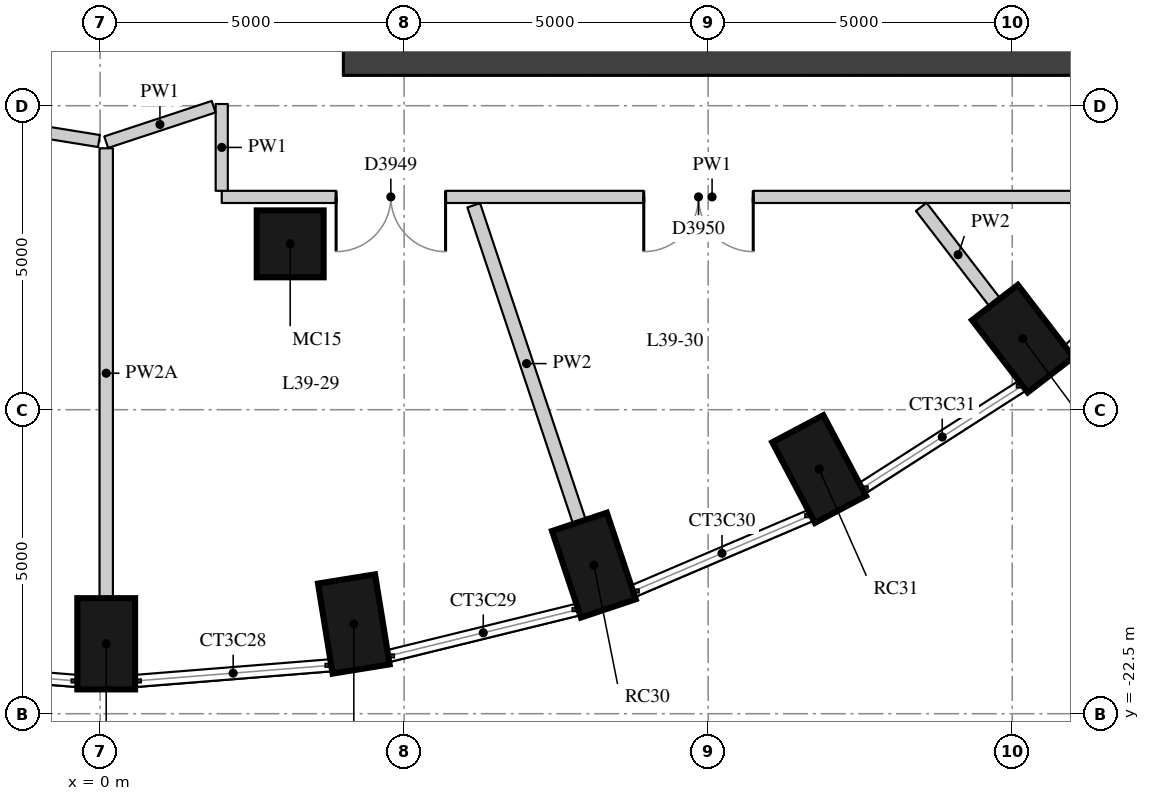
"""IFC4 building model, lengths in metres.
Left out: names, types, materials, properties, quantities, classifications, styles, units other than length and angle.
Written with IfcOpenShell. Run it as: python <this file> out.ifc"""

import sys

from ifc_helpers import new_model, si_unit, direction, frame, frame_2d, origin, origin_2d, place, context, subcontext, project, spatial, rectangle, extrude, element, fill, save


model = new_model("IFC4")
c1 = context("Model", 3, precision=1e-05, world=origin(), true_north=direction((0.0, 1.0)))
c2 = subcontext(c1, "Body", "Model", "MODEL_VIEW")
j1 = project(units=[si_unit("LENGTHUNIT", "METRE"), si_unit("PLANEANGLEUNIT", "RADIAN")], contexts=[c1])
p1 = place(None, origin())
s1 = spatial("IfcSite", under=j1, at=p1, CompositionType="ELEMENT")
p2 = place(p1, origin())
s2 = spatial("IfcBuilding", under=s1, at=p2, CompositionType="ELEMENT")
p3 = place(p2, frame((0.0, 0.0, 139.6)))
s3 = spatial("IfcBuildingStorey", under=s2, at=p3, CompositionType="ELEMENT", Elevation=139.6)
for number, where, z_axis, x_axis in (
    (1, (0.1, -21.35, 0.0), (0.0, 0.0, 1.0), (0.0, -1.0, 0.0)),
    (2, (4.172, -21.024, 0.0), (0.0, 0.0, 1.0), (0.16, -0.987, 0.0)),
    (3, (8.12, -20.056, 0.0), (0.0, 0.0, 1.0), (0.317, -0.949, 0.0)),
    (4, (11.825, -18.476, 0.0), (0.0, 0.0, 1.0), (0.468, -0.884, 0.0)),
    (5, (15.173, -16.332, 0.0), (0.0, 0.0, 1.0), (0.61, -0.792, 0.0)),
):
    element("IfcColumn", number, at=place(p3, frame(where, z_axis=z_axis, x_axis=x_axis)), inside=s3, PredefinedType="COLUMN", context=c2, shape_type="SweptSolid", body=[
        extrude(rectangle(XDim=1.5, YDim=0.95, at=origin_2d()), origin(), (0.0, 0.0, 1.0), 5.5),
    ])
p4 = place(p3, frame((3.126, -14.772, 0.0), z_axis=(0.0, 0.0, 1.0), x_axis=(1.0, 0.0, 0.0)))
e6 = element("IfcColumn", 6, at=p4, inside=s3, PredefinedType="COLUMN", context=c2, shape_type="SweptSolid", body=[
    extrude(rectangle(XDim=1.1, YDim=1.1, at=origin_2d()), origin(), (0.0, 0.0, 1.0), 5.5),
])
p5 = place(p3, frame((4.0, -11.55, 0.0), z_axis=(0.0, 0.0, 1.0), x_axis=(1.0, 0.0, 0.0)))
e7 = element("IfcWall", 7, at=p5, inside=s3, PredefinedType="SHEAR", context=c2, shape_type="SweptSolid", body=[
    extrude(rectangle(XDim=15.2, YDim=0.9, at=frame_2d((7.6, 0.0))), origin(), (0.0, 0.0, 1.0), 5.22),
])
p6 = place(p3, frame((18.128, -14.0, 0.0), z_axis=(0.0, 0.0, 1.0), x_axis=(-1.0, 0.0, 0.0)))
e8 = element("IfcWall", 8, at=p6, inside=s3, PredefinedType="PARTITIONING", context=c2, shape_type="SweptSolid", body=[
    extrude(rectangle(XDim=16.128, YDim=0.2, at=frame_2d((8.064, 0.0))), origin(), (0.0, 0.0, 1.0), 5.22),
])
p7 = place(p6, frame((12.447, 0.0, 0.0)))
e9 = element("IfcOpeningElement", 9, at=p7, cuts=e8, PredefinedType="OPENING", context=c2, shape_type="SweptSolid", body=[
    extrude(rectangle(XDim=1.8, YDim=2.1, at=frame_2d((0.9, 1.05))), frame((0.0, 0.11, 0.0), z_axis=(0.0, -1.0, 0.0), x_axis=(1.0, 0.0, 0.0)), (0.0, 0.0, 1.0), 0.22),
])
p8 = place(p6, frame((7.387, 0.0, 0.0)))
e10 = element("IfcOpeningElement", 10, at=p8, cuts=e8, PredefinedType="OPENING", context=c2, shape_type="SweptSolid", body=[
    extrude(rectangle(XDim=1.8, YDim=2.1, at=frame_2d((0.9, 1.05))), frame((0.0, 0.11, 0.0), z_axis=(0.0, -1.0, 0.0), x_axis=(1.0, 0.0, 0.0)), (0.0, 0.0, 1.0), 0.22),
])
p9 = place(p3, frame((2.0, -13.9, 0.0), z_axis=(0.0, 0.0, 1.0), x_axis=(0.0, 1.0, 0.0)))
e11 = element("IfcWall", 11, at=p9, inside=s3, PredefinedType="PARTITIONING", context=c2, shape_type="SweptSolid", body=[
    extrude(rectangle(XDim=1.428, YDim=0.2, at=frame_2d((0.714, 0.0))), origin(), (0.0, 0.0, 1.0), 5.22),
])
p10 = place(p3, frame((1.867, -12.517, 0.0), z_axis=(0.0, 0.0, 1.0), x_axis=(-0.949545826554, -0.313628320269, 0.0)))
e12 = element("IfcWall", 12, at=p10, inside=s3, PredefinedType="PARTITIONING", context=c2, shape_type="SweptSolid", body=[
    extrude(rectangle(XDim=1.86, YDim=0.2, at=frame_2d((0.93, 0.0))), origin(), (0.0, 0.0, 1.0), 5.22),
])
p11 = place(p3, frame((-0.019, -13.081, 0.0), z_axis=(0.0, 0.0, 1.0), x_axis=(-0.987225228175, 0.159330941296, 0.0)))
e13 = element("IfcWall", 13, at=p11, inside=s3, PredefinedType="PARTITIONING", context=c2, shape_type="SweptSolid", body=[
    extrude(rectangle(XDim=5.377, YDim=0.2, at=frame_2d((2.688, 0.0))), origin(), (0.0, 0.0, 1.0), 5.22),
])
p12 = place(p11, frame((1.262, 0.0, 0.0)))
e14 = element("IfcOpeningElement", 14, at=p12, cuts=e13, PredefinedType="OPENING", context=c2, shape_type="SweptSolid", body=[
    extrude(rectangle(XDim=1.8, YDim=2.1, at=frame_2d((0.9, 1.05))), frame((0.0, 0.11, 0.0), z_axis=(0.0, -1.0, 0.0), x_axis=(1.0, 0.0, 0.0)), (0.0, 0.0, 1.0), 0.22),
])
p13 = place(p3, frame((0.1, -20.6, 0.0), z_axis=(0.0, 0.0, 1.0), x_axis=(0.0, 1.0, 0.0)))
e15 = element("IfcWall", 15, at=p13, inside=s3, PredefinedType="PARTITIONING", context=c2, shape_type="SweptSolid", body=[
    extrude(rectangle(XDim=7.4, YDim=0.22, at=frame_2d((3.7, 0.0))), origin(), (0.0, 0.0, 1.0), 4.77),
])
p14 = place(p3, frame((7.883, -19.345, 0.0), z_axis=(0.0, 0.0, 1.0), x_axis=(-0.316708057884, 0.948523065651, 0.0)))
e16 = element("IfcWall", 16, at=p14, inside=s3, PredefinedType="PARTITIONING", context=c2, shape_type="SweptSolid", body=[
    extrude(rectangle(XDim=5.489, YDim=0.22, at=frame_2d((2.745, 0.0))), origin(), (0.0, 0.0, 1.0), 5.22),
])
p15 = place(p3, frame((14.716, -15.737, 0.0), z_axis=(0.0, 0.0, 1.0), x_axis=(-0.609984006336, 0.792413725281, 0.0)))
e17 = element("IfcWall", 17, at=p15, inside=s3, PredefinedType="PARTITIONING", context=c2, shape_type="SweptSolid", body=[
    extrude(rectangle(XDim=1.986, YDim=0.22, at=frame_2d((0.993, 0.0))), origin(), (0.0, 0.0, 1.0), 5.22),
])
p16 = place(p7, origin())
e18 = element("IfcDoor", 18, at=p16, inside=s3, OperationType="DOUBLE_DOOR_SINGLE_SWING", PredefinedType="DOOR", context=c2, shape_type="SweptSolid", body=[
    extrude(rectangle(XDim=1.8, YDim=2.1, at=frame_2d((0.9, 1.05))), frame((0.0, 0.025, 0.0), z_axis=(0.0, -1.0, 0.0), x_axis=(1.0, 0.0, 0.0)), (0.0, 0.0, 1.0), 0.05),
])
fill(e9, e18)
p17 = place(p8, origin())
e19 = element("IfcDoor", 19, at=p17, inside=s3, OperationType="DOUBLE_DOOR_SINGLE_SWING", PredefinedType="DOOR", context=c2, shape_type="SweptSolid", body=[
    extrude(rectangle(XDim=1.8, YDim=2.1, at=frame_2d((0.9, 1.05))), frame((0.0, 0.025, 0.0), z_axis=(0.0, -1.0, 0.0), x_axis=(1.0, 0.0, 0.0)), (0.0, 0.0, 1.0), 0.05),
])
fill(e10, e19)
save(model, sys.argv[1])
